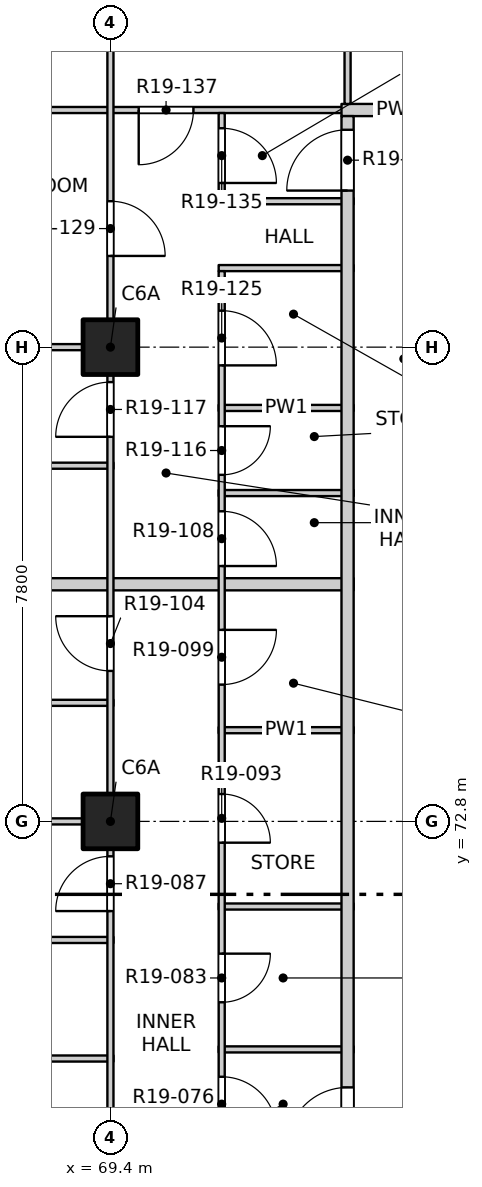
"""IFC4 building model, lengths in metres.
Left out: names, types, materials, properties, quantities, classifications, styles, units other than length and angle.
Written with IfcOpenShell. Run it as: python <this file> out.ifc"""

import sys

from ifc_helpers import new_model, si_unit, direction, frame, frame_2d, origin, origin_2d, place, context, subcontext, project, spatial, rectangle, extrude, element, fill, save


model = new_model("IFC4")
c1 = context("Model", 3, precision=1e-05, world=origin(), true_north=direction((0.0, 1.0)))
c2 = subcontext(c1, "Body", "Model", "MODEL_VIEW")
j1 = project(units=[si_unit("LENGTHUNIT", "METRE"), si_unit("PLANEANGLEUNIT", "RADIAN")], contexts=[c1])
p1 = place(None, origin())
s1 = spatial("IfcSite", under=j1, at=p1, CompositionType="ELEMENT")
p2 = place(p1, origin())
s2 = spatial("IfcBuilding", under=s1, at=p2, CompositionType="ELEMENT")
p3 = place(p2, frame((0.0, 0.0, 197.3)))
s3 = spatial("IfcBuildingStorey", under=s2, at=p3, CompositionType="ELEMENT", Elevation=197.3)
for number, where, z_axis, x_axis in (
    (1, (69.4, 72.8, -0.3), (0.0, 0.0, 1.0), (1.0, 0.0, 0.0)),
    (2, (69.4, 80.6, -0.3), (0.0, 0.0, 1.0), (1.0, 0.0, 0.0)),
):
    element("IfcColumn", number, at=place(p3, frame(where, z_axis=z_axis, x_axis=x_axis)), inside=s3, PredefinedType="COLUMN", context=c2, shape_type="SweptSolid", body=[
        extrude(rectangle(XDim=0.9, YDim=0.9, at=origin_2d()), origin(), (0.0, 0.0, 1.0), 3.45),
    ])
p4 = place(p3, frame((61.9, 68.9, 0.0), z_axis=(0.0, 0.0, 1.0), x_axis=(1.0, 0.0, 0.0)))
e3 = element("IfcWall", 3, at=p4, inside=s3, PredefinedType="PARTITIONING", context=c2, shape_type="SweptSolid", body=[
    extrude(rectangle(XDim=7.55, YDim=0.1, at=frame_2d((3.775, 0.0))), origin(), (0.0, 0.0, 1.0), 2.55),
])
p5 = place(p3, frame((71.18, 69.05, 0.0), z_axis=(0.0, 0.0, 1.0), x_axis=(1.0, 0.0, 0.0)))
e4 = element("IfcWall", 4, at=p5, inside=s3, PredefinedType="PARTITIONING", context=c2, shape_type="SweptSolid", body=[
    extrude(rectangle(XDim=2.22, YDim=0.1, at=frame_2d((1.11, 0.0))), origin(), (0.0, 0.0, 1.0), 2.55),
])
p6 = place(p3, frame((65.75, 70.85, 0.0), z_axis=(0.0, 0.0, 1.0), x_axis=(1.0, 0.0, 0.0)))
e5 = element("IfcWall", 5, at=p6, inside=s3, PredefinedType="PARTITIONING", context=c2, shape_type="SweptSolid", body=[
    extrude(rectangle(XDim=3.7, YDim=0.1, at=frame_2d((1.85, 0.0))), origin(), (0.0, 0.0, 1.0), 3.15),
])
p7 = place(p3, frame((71.18, 71.4, 0.0), z_axis=(0.0, 0.0, 1.0), x_axis=(1.0, 0.0, 0.0)))
e6 = element("IfcWall", 6, at=p7, inside=s3, PredefinedType="PARTITIONING", context=c2, shape_type="SweptSolid", body=[
    extrude(rectangle(XDim=2.22, YDim=0.1, at=frame_2d((1.11, 0.0))), origin(), (0.0, 0.0, 1.0), 3.15),
])
p8 = place(p3, frame((61.9, 72.8, 0.0), z_axis=(0.0, 0.0, 1.0), x_axis=(1.0, 0.0, 0.0)))
e7 = element("IfcWall", 7, at=p8, inside=s3, PredefinedType="PARTITIONING", context=c2, shape_type="SweptSolid", body=[
    extrude(rectangle(XDim=7.55, YDim=0.1, at=frame_2d((3.775, 0.0))), origin(), (0.0, 0.0, 1.0), 3.15),
])
p9 = place(p3, frame((71.18, 74.3, 0.0), z_axis=(0.0, 0.0, 1.0), x_axis=(1.0, 0.0, 0.0)))
e8 = element("IfcWall", 8, at=p9, inside=s3, PredefinedType="PARTITIONING", context=c2, shape_type="SweptSolid", body=[
    extrude(rectangle(XDim=2.22, YDim=0.1, at=frame_2d((1.11, 0.0))), origin(), (0.0, 0.0, 1.0), 3.15),
])
p10 = place(p3, frame((65.75, 74.75, 0.0), z_axis=(0.0, 0.0, 1.0), x_axis=(1.0, 0.0, 0.0)))
e9 = element("IfcWall", 9, at=p10, inside=s3, PredefinedType="PARTITIONING", context=c2, shape_type="SweptSolid", body=[
    extrude(rectangle(XDim=3.7, YDim=0.1, at=frame_2d((1.85, 0.0))), origin(), (0.0, 0.0, 1.0), 3.15),
])
p11 = place(p3, frame((61.9, 76.7, 0.0), z_axis=(0.0, 0.0, 1.0), x_axis=(1.0, 0.0, 0.0)))
e10 = element("IfcWall", 10, at=p11, inside=s3, PredefinedType="PARTITIONING", context=c2, shape_type="SweptSolid", body=[
    extrude(rectangle(XDim=11.5, YDim=0.2, at=frame_2d((5.75, 0.0))), origin(), (0.0, 0.0, 1.0), 2.55),
])
p12 = place(p3, frame((71.18, 78.2, 0.0), z_axis=(0.0, 0.0, 1.0), x_axis=(1.0, 0.0, 0.0)))
e11 = element("IfcWall", 11, at=p12, inside=s3, PredefinedType="PARTITIONING", context=c2, shape_type="SweptSolid", body=[
    extrude(rectangle(XDim=2.22, YDim=0.1, at=frame_2d((1.11, 0.0))), origin(), (0.0, 0.0, 1.0), 3.15),
])
p13 = place(p3, frame((65.75, 78.65, 0.0), z_axis=(0.0, 0.0, 1.0), x_axis=(1.0, 0.0, 0.0)))
e12 = element("IfcWall", 12, at=p13, inside=s3, PredefinedType="PARTITIONING", context=c2, shape_type="SweptSolid", body=[
    extrude(rectangle(XDim=3.7, YDim=0.1, at=frame_2d((1.85, 0.0))), origin(), (0.0, 0.0, 1.0), 3.15),
])
p14 = place(p3, frame((71.18, 79.6, 0.0), z_axis=(0.0, 0.0, 1.0), x_axis=(1.0, 0.0, 0.0)))
e13 = element("IfcWall", 13, at=p14, inside=s3, PredefinedType="PARTITIONING", context=c2, shape_type="SweptSolid", body=[
    extrude(rectangle(XDim=2.22, YDim=0.1, at=frame_2d((1.11, 0.0))), origin(), (0.0, 0.0, 1.0), 3.15),
])
p15 = place(p3, frame((61.9, 80.6, 0.0), z_axis=(0.0, 0.0, 1.0), x_axis=(1.0, 0.0, 0.0)))
e14 = element("IfcWall", 14, at=p15, inside=s3, PredefinedType="PARTITIONING", context=c2, shape_type="SweptSolid", body=[
    extrude(rectangle(XDim=7.55, YDim=0.1, at=frame_2d((3.775, 0.0))), origin(), (0.0, 0.0, 1.0), 3.15),
])
for number, where, z_axis, x_axis in (
    (15, (71.18, 81.9, 0.0), (0.0, 0.0, 1.0), (1.0, 0.0, 0.0)),
    (16, (71.18, 83.0, 0.0), (0.0, 0.0, 1.0), (1.0, 0.0, 0.0)),
):
    element("IfcWall", number, at=place(p3, frame(where, z_axis=z_axis, x_axis=x_axis)), inside=s3, PredefinedType="PARTITIONING", context=c2, shape_type="SweptSolid", body=[
        extrude(rectangle(XDim=2.22, YDim=0.1, at=frame_2d((1.11, 0.0))), origin(), (0.0, 0.0, 1.0), 3.15),
    ])
p16 = place(p3, frame((61.9, 84.5, 0.0), z_axis=(0.0, 0.0, 1.0), x_axis=(1.0, 0.0, 0.0)))
e17 = element("IfcWall", 17, at=p16, inside=s3, PredefinedType="PARTITIONING", context=c2, shape_type="SweptSolid", body=[
    extrude(rectangle(XDim=11.5, YDim=0.1, at=frame_2d((5.75, 0.0))), origin(), (0.0, 0.0, 1.0), 3.15),
])
p17 = place(p16, frame((7.965, 0.0, 0.0)))
e18 = element("IfcOpeningElement", 18, at=p17, cuts=e17, PredefinedType="OPENING", context=c2, shape_type="SweptSolid", body=[
    extrude(rectangle(XDim=0.9, YDim=2.1, at=frame_2d((0.45, 1.05))), frame((0.0, 0.06, 0.0), z_axis=(0.0, -1.0, 0.0), x_axis=(1.0, 0.0, 0.0)), (0.0, 0.0, 1.0), 0.12),
])
p18 = place(p3, frame((73.2, 84.5, 0.0), z_axis=(0.0, 0.0, 1.0), x_axis=(1.0, 0.0, 0.0)))
e19 = element("IfcWall", 19, at=p18, inside=s3, PredefinedType="PARTITIONING", context=c2, shape_type="SweptSolid", body=[
    extrude(rectangle(XDim=1.85, YDim=0.2, at=frame_2d((0.925, 0.0))), origin(), (0.0, 0.0, 1.0), 3.15),
])
p19 = place(p3, frame((69.4, 41.9, 0.0), z_axis=(0.0, 0.0, 1.0), x_axis=(0.0, 1.0, 0.0)))
e20 = element("IfcWall", 20, at=p19, inside=s3, PredefinedType="PARTITIONING", context=c2, shape_type="SweptSolid", body=[
    extrude(rectangle(XDim=46.2, YDim=0.1, at=frame_2d((23.1, 0.0))), origin(), (0.0, 0.0, 1.0), 3.15),
])
p20 = place(p19, frame((1.2, 0.0, 0.0)))
e21 = element("IfcOpeningElement", 21, at=p20, cuts=e20, PredefinedType="OPENING", context=c2, shape_type="SweptSolid", body=[
    extrude(rectangle(XDim=0.9, YDim=2.1, at=frame_2d((0.45, 1.05))), frame((0.0, 0.06, 0.0), z_axis=(0.0, -1.0, 0.0), x_axis=(1.0, 0.0, 0.0)), (0.0, 0.0, 1.0), 0.12),
])
p21 = place(p19, frame((5.1, 0.0, 0.0)))
e22 = element("IfcOpeningElement", 22, at=p21, cuts=e20, PredefinedType="OPENING", context=c2, shape_type="SweptSolid", body=[
    extrude(rectangle(XDim=0.9, YDim=2.1, at=frame_2d((0.45, 1.05))), frame((0.0, 0.06, 0.0), z_axis=(0.0, -1.0, 0.0), x_axis=(1.0, 0.0, 0.0)), (0.0, 0.0, 1.0), 0.12),
])
p22 = place(p19, frame((9.0, 0.0, 0.0)))
e23 = element("IfcOpeningElement", 23, at=p22, cuts=e20, PredefinedType="OPENING", context=c2, shape_type="SweptSolid", body=[
    extrude(rectangle(XDim=0.9, YDim=2.1, at=frame_2d((0.45, 1.05))), frame((0.0, 0.06, 0.0), z_axis=(0.0, -1.0, 0.0), x_axis=(1.0, 0.0, 0.0)), (0.0, 0.0, 1.0), 0.12),
])
p23 = place(p19, frame((13.85, 0.0, 0.0)))
e24 = element("IfcOpeningElement", 24, at=p23, cuts=e20, PredefinedType="OPENING", context=c2, shape_type="SweptSolid", body=[
    extrude(rectangle(XDim=0.9, YDim=2.1, at=frame_2d((0.45, 1.05))), frame((0.0, 0.06, 0.0), z_axis=(0.0, -1.0, 0.0), x_axis=(1.0, 0.0, 0.0)), (0.0, 0.0, 1.0), 0.12),
])
p24 = place(p19, frame((17.775, 0.0, 0.0)))
e25 = element("IfcOpeningElement", 25, at=p24, cuts=e20, PredefinedType="OPENING", context=c2, shape_type="SweptSolid", body=[
    extrude(rectangle(XDim=0.9, YDim=2.1, at=frame_2d((0.45, 1.05))), frame((0.0, 0.06, 0.0), z_axis=(0.0, -1.0, 0.0), x_axis=(1.0, 0.0, 0.0)), (0.0, 0.0, 1.0), 0.12),
])
p25 = place(p19, frame((21.625, 0.0, 0.0)))
e26 = element("IfcOpeningElement", 26, at=p25, cuts=e20, PredefinedType="OPENING", context=c2, shape_type="SweptSolid", body=[
    extrude(rectangle(XDim=0.9, YDim=2.1, at=frame_2d((0.45, 1.05))), frame((0.0, 0.06, 0.0), z_axis=(0.0, -1.0, 0.0), x_axis=(1.0, 0.0, 0.0)), (0.0, 0.0, 1.0), 0.12),
])
p26 = place(p19, frame((24.6, 0.0, 0.0)))
e27 = element("IfcOpeningElement", 27, at=p26, cuts=e20, PredefinedType="OPENING", context=c2, shape_type="SweptSolid", body=[
    extrude(rectangle(XDim=0.9, YDim=2.1, at=frame_2d((0.45, 1.05))), frame((0.0, 0.06, 0.0), z_axis=(0.0, -1.0, 0.0), x_axis=(1.0, 0.0, 0.0)), (0.0, 0.0, 1.0), 0.12),
])
p27 = place(p19, frame((29.425, 0.0, 0.0)))
e28 = element("IfcOpeningElement", 28, at=p27, cuts=e20, PredefinedType="OPENING", context=c2, shape_type="SweptSolid", body=[
    extrude(rectangle(XDim=0.9, YDim=2.1, at=frame_2d((0.45, 1.05))), frame((0.0, 0.06, 0.0), z_axis=(0.0, -1.0, 0.0), x_axis=(1.0, 0.0, 0.0)), (0.0, 0.0, 1.0), 0.12),
])
p28 = place(p19, frame((33.375, 0.0, 0.0)))
e29 = element("IfcOpeningElement", 29, at=p28, cuts=e20, PredefinedType="OPENING", context=c2, shape_type="SweptSolid", body=[
    extrude(rectangle(XDim=0.9, YDim=2.1, at=frame_2d((0.45, 1.05))), frame((0.0, 0.06, 0.0), z_axis=(0.0, -1.0, 0.0), x_axis=(1.0, 0.0, 0.0)), (0.0, 0.0, 1.0), 0.12),
])
p29 = place(p19, frame((37.225, 0.0, 0.0)))
e30 = element("IfcOpeningElement", 30, at=p29, cuts=e20, PredefinedType="OPENING", context=c2, shape_type="SweptSolid", body=[
    extrude(rectangle(XDim=0.9, YDim=2.1, at=frame_2d((0.45, 1.05))), frame((0.0, 0.06, 0.0), z_axis=(0.0, -1.0, 0.0), x_axis=(1.0, 0.0, 0.0)), (0.0, 0.0, 1.0), 0.12),
])
p30 = place(p19, frame((40.2, 0.0, 0.0)))
e31 = element("IfcOpeningElement", 31, at=p30, cuts=e20, PredefinedType="OPENING", context=c2, shape_type="SweptSolid", body=[
    extrude(rectangle(XDim=0.9, YDim=2.1, at=frame_2d((0.45, 1.05))), frame((0.0, 0.06, 0.0), z_axis=(0.0, -1.0, 0.0), x_axis=(1.0, 0.0, 0.0)), (0.0, 0.0, 1.0), 0.12),
])
p31 = place(p19, frame((44.1, 0.0, 0.0)))
e32 = element("IfcOpeningElement", 32, at=p31, cuts=e20, PredefinedType="OPENING", context=c2, shape_type="SweptSolid", body=[
    extrude(rectangle(XDim=0.9, YDim=2.1, at=frame_2d((0.45, 1.05))), frame((0.0, 0.06, 0.0), z_axis=(0.0, -1.0, 0.0), x_axis=(1.0, 0.0, 0.0)), (0.0, 0.0, 1.0), 0.12),
])
p32 = place(p3, frame((71.23, 67.3, 0.0), z_axis=(0.0, 0.0, 1.0), x_axis=(0.0, 1.0, 0.0)))
e33 = element("IfcWall", 33, at=p32, inside=s3, PredefinedType="PARTITIONING", context=c2, shape_type="SweptSolid", body=[
    extrude(rectangle(XDim=14.55, YDim=0.1, at=frame_2d((7.275, 0.0))), origin(), (0.0, 0.0, 1.0), 3.15),
])
p33 = place(p32, frame((0.4, 0.0, 0.0)))
e34 = element("IfcOpeningElement", 34, at=p33, cuts=e33, PredefinedType="OPENING", context=c2, shape_type="SweptSolid", body=[
    extrude(rectangle(XDim=0.9, YDim=2.1, at=frame_2d((0.45, 1.05))), frame((0.0, 0.06, 0.0), z_axis=(0.0, -1.0, 0.0), x_axis=(1.0, 0.0, 0.0)), (0.0, 0.0, 1.0), 0.12),
])
p34 = place(p32, frame((2.525, 0.0, 0.0)))
e35 = element("IfcOpeningElement", 35, at=p34, cuts=e33, PredefinedType="OPENING", context=c2, shape_type="SweptSolid", body=[
    extrude(rectangle(XDim=0.8, YDim=2.1, at=frame_2d((0.4, 1.05))), frame((0.0, 0.06, 0.0), z_axis=(0.0, -1.0, 0.0), x_axis=(1.0, 0.0, 0.0)), (0.0, 0.0, 1.0), 0.12),
])
p35 = place(p32, frame((5.15, 0.0, 0.0)))
e36 = element("IfcOpeningElement", 36, at=p35, cuts=e33, PredefinedType="OPENING", context=c2, shape_type="SweptSolid", body=[
    extrude(rectangle(XDim=0.8, YDim=2.1, at=frame_2d((0.4, 1.05))), frame((0.0, 0.06, 0.0), z_axis=(0.0, -1.0, 0.0), x_axis=(1.0, 0.0, 0.0)), (0.0, 0.0, 1.0), 0.12),
])
p36 = place(p32, frame((7.75, 0.0, 0.0)))
e37 = element("IfcOpeningElement", 37, at=p36, cuts=e33, PredefinedType="OPENING", context=c2, shape_type="SweptSolid", body=[
    extrude(rectangle(XDim=0.9, YDim=2.1, at=frame_2d((0.45, 1.05))), frame((0.0, 0.06, 0.0), z_axis=(0.0, -1.0, 0.0), x_axis=(1.0, 0.0, 0.0)), (0.0, 0.0, 1.0), 0.12),
])
p37 = place(p32, frame((9.7, 0.0, 0.0)))
e38 = element("IfcOpeningElement", 38, at=p37, cuts=e33, PredefinedType="OPENING", context=c2, shape_type="SweptSolid", body=[
    extrude(rectangle(XDim=0.9, YDim=2.1, at=frame_2d((0.45, 1.05))), frame((0.0, 0.06, 0.0), z_axis=(0.0, -1.0, 0.0), x_axis=(1.0, 0.0, 0.0)), (0.0, 0.0, 1.0), 0.12),
])
p38 = place(p32, frame((11.2, 0.0, 0.0)))
e39 = element("IfcOpeningElement", 39, at=p38, cuts=e33, PredefinedType="OPENING", context=c2, shape_type="SweptSolid", body=[
    extrude(rectangle(XDim=0.8, YDim=2.1, at=frame_2d((0.4, 1.05))), frame((0.0, 0.06, 0.0), z_axis=(0.0, -1.0, 0.0), x_axis=(1.0, 0.0, 0.0)), (0.0, 0.0, 1.0), 0.12),
])
p39 = place(p32, frame((13.0, 0.0, 0.0)))
e40 = element("IfcOpeningElement", 40, at=p39, cuts=e33, PredefinedType="OPENING", context=c2, shape_type="SweptSolid", body=[
    extrude(rectangle(XDim=0.9, YDim=2.1, at=frame_2d((0.45, 1.05))), frame((0.0, 0.06, 0.0), z_axis=(0.0, -1.0, 0.0), x_axis=(1.0, 0.0, 0.0)), (0.0, 0.0, 1.0), 0.12),
])
p40 = place(p3, frame((71.23, 83.05, 0.0), z_axis=(0.0, 0.0, 1.0), x_axis=(0.0, 1.0, 0.0)))
e41 = element("IfcWall", 41, at=p40, inside=s3, PredefinedType="PARTITIONING", context=c2, shape_type="SweptSolid", body=[
    extrude(rectangle(XDim=1.4, YDim=0.1, at=frame_2d((0.7, 0.0))), origin(), (0.0, 0.0, 1.0), 3.15),
])
p41 = place(p40, frame((0.25, 0.0, 0.0)))
e42 = element("IfcOpeningElement", 42, at=p41, cuts=e41, PredefinedType="OPENING", context=c2, shape_type="SweptSolid", body=[
    extrude(rectangle(XDim=0.9, YDim=2.1, at=frame_2d((0.45, 1.05))), frame((0.0, 0.06, 0.0), z_axis=(0.0, -1.0, 0.0), x_axis=(1.0, 0.0, 0.0)), (0.0, 0.0, 1.0), 0.12),
])
p42 = place(p3, frame((73.3, 49.5, 0.0), z_axis=(0.0, 0.0, 1.0), x_axis=(0.0, 1.0, 0.0)))
e43 = element("IfcWall", 43, at=p42, inside=s3, PredefinedType="PARTITIONING", context=c2, shape_type="SweptSolid", body=[
    extrude(rectangle(XDim=34.9, YDim=0.2, at=frame_2d((17.45, 0.0))), origin(), (0.0, 0.0, 1.0), 3.15),
])
p43 = place(p42, frame((9.725, 0.0, 0.0)))
e44 = element("IfcOpeningElement", 44, at=p43, cuts=e43, PredefinedType="OPENING", context=c2, shape_type="SweptSolid", body=[
    extrude(rectangle(XDim=1.0, YDim=2.1, at=frame_2d((0.5, 1.05))), frame((0.0, 0.11, 0.0), z_axis=(0.0, -1.0, 0.0), x_axis=(1.0, 0.0, 0.0)), (0.0, 0.0, 1.0), 0.22),
])
p44 = place(p42, frame((17.925, 0.0, 0.0)))
e45 = element("IfcOpeningElement", 45, at=p44, cuts=e43, PredefinedType="OPENING", context=c2, shape_type="SweptSolid", body=[
    extrude(rectangle(XDim=1.0, YDim=2.1, at=frame_2d((0.5, 1.05))), frame((0.0, 0.11, 0.0), z_axis=(0.0, -1.0, 0.0), x_axis=(1.0, 0.0, 0.0)), (0.0, 0.0, 1.0), 0.22),
])
p45 = place(p42, frame((33.675, 0.0, 0.0)))
e46 = element("IfcOpeningElement", 46, at=p45, cuts=e43, PredefinedType="OPENING", context=c2, shape_type="SweptSolid", body=[
    extrude(rectangle(XDim=1.0, YDim=2.1, at=frame_2d((0.5, 1.05))), frame((0.0, 0.11, 0.0), z_axis=(0.0, -1.0, 0.0), x_axis=(1.0, 0.0, 0.0)), (0.0, 0.0, 1.0), 0.22),
])
p46 = place(p3, frame((73.3, 84.6, 0.0), z_axis=(0.0, 0.0, 1.0), x_axis=(0.0, 1.0, 0.0)))
e47 = element("IfcWall", 47, at=p46, inside=s3, PredefinedType="PARTITIONING", context=c2, shape_type="SweptSolid", body=[
    extrude(rectangle(XDim=3.5, YDim=0.1, at=frame_2d((1.75, 0.0))), origin(), (0.0, 0.0, 1.0), 3.15),
])
p47 = place(p46, frame((1.4, 0.0, 0.0)))
e48 = element("IfcOpeningElement", 48, at=p47, cuts=e47, PredefinedType="OPENING", context=c2, shape_type="SweptSolid", body=[
    extrude(rectangle(XDim=0.9, YDim=2.1, at=frame_2d((0.45, 1.05))), frame((0.0, 0.06, 0.0), z_axis=(0.0, -1.0, 0.0), x_axis=(1.0, 0.0, 0.0)), (0.0, 0.0, 1.0), 0.12),
])
p48 = place(p44, origin())
e49 = element("IfcDoor", 49, at=p48, inside=s3, OperationType="SINGLE_SWING_RIGHT", PredefinedType="DOOR", context=c2, shape_type="SweptSolid", body=[
    extrude(rectangle(XDim=1.0, YDim=2.1, at=frame_2d((0.5, 1.05))), frame((0.0, 0.025, 0.0), z_axis=(0.0, -1.0, 0.0), x_axis=(1.0, 0.0, 0.0)), (0.0, 0.0, 1.0), 0.05),
])
fill(e45, e49)
p49 = place(p33, origin())
e50 = element("IfcDoor", 50, at=p49, inside=s3, OperationType="SINGLE_SWING_RIGHT", PredefinedType="DOOR", context=c2, shape_type="SweptSolid", body=[
    extrude(rectangle(XDim=0.9, YDim=2.1, at=frame_2d((0.45, 1.05))), frame((0.0, 0.025, 0.0), z_axis=(0.0, -1.0, 0.0), x_axis=(1.0, 0.0, 0.0)), (0.0, 0.0, 1.0), 0.05),
])
fill(e34, e50)
p50 = place(p34, origin())
e51 = element("IfcDoor", 51, at=p50, inside=s3, OperationType="SINGLE_SWING_LEFT", PredefinedType="DOOR", context=c2, shape_type="SweptSolid", body=[
    extrude(rectangle(XDim=0.8, YDim=2.1, at=frame_2d((0.4, 1.05))), frame((0.0, 0.025, 0.0), z_axis=(0.0, -1.0, 0.0), x_axis=(1.0, 0.0, 0.0)), (0.0, 0.0, 1.0), 0.05),
])
fill(e35, e51)
p51 = place(p27, origin())
e52 = element("IfcDoor", 52, at=p51, inside=s3, OperationType="SINGLE_SWING_LEFT", PredefinedType="DOOR", context=c2, shape_type="SweptSolid", body=[
    extrude(rectangle(XDim=0.9, YDim=2.1, at=frame_2d((0.45, 1.05))), frame((0.0, 0.025, 0.0), z_axis=(0.0, -1.0, 0.0), x_axis=(1.0, 0.0, 0.0)), (0.0, 0.0, 1.0), 0.05),
])
fill(e28, e52)
p52 = place(p35, origin())
e53 = element("IfcDoor", 53, at=p52, inside=s3, OperationType="SINGLE_SWING_RIGHT", PredefinedType="DOOR", context=c2, shape_type="SweptSolid", body=[
    extrude(rectangle(XDim=0.8, YDim=2.1, at=frame_2d((0.4, 1.05))), frame((0.0, 0.025, 0.0), z_axis=(0.0, -1.0, 0.0), x_axis=(1.0, 0.0, 0.0)), (0.0, 0.0, 1.0), 0.05),
])
fill(e36, e53)
p53 = place(p36, origin())
e54 = element("IfcDoor", 54, at=p53, inside=s3, OperationType="SINGLE_SWING_LEFT", PredefinedType="DOOR", context=c2, shape_type="SweptSolid", body=[
    extrude(rectangle(XDim=0.9, YDim=2.1, at=frame_2d((0.45, 1.05))), frame((0.0, 0.025, 0.0), z_axis=(0.0, -1.0, 0.0), x_axis=(1.0, 0.0, 0.0)), (0.0, 0.0, 1.0), 0.05),
])
fill(e37, e54)
p54 = place(p28, origin())
e55 = element("IfcDoor", 55, at=p54, inside=s3, OperationType="SINGLE_SWING_RIGHT", PredefinedType="DOOR", context=c2, shape_type="SweptSolid", body=[
    extrude(rectangle(XDim=0.9, YDim=2.1, at=frame_2d((0.45, 1.05))), frame((0.0, 0.025, 0.0), z_axis=(0.0, -1.0, 0.0), x_axis=(1.0, 0.0, 0.0)), (0.0, 0.0, 1.0), 0.05),
])
fill(e29, e55)
p55 = place(p37, origin())
e56 = element("IfcDoor", 56, at=p55, inside=s3, OperationType="SINGLE_SWING_RIGHT", PredefinedType="DOOR", context=c2, shape_type="SweptSolid", body=[
    extrude(rectangle(XDim=0.9, YDim=2.1, at=frame_2d((0.45, 1.05))), frame((0.0, 0.025, 0.0), z_axis=(0.0, -1.0, 0.0), x_axis=(1.0, 0.0, 0.0)), (0.0, 0.0, 1.0), 0.05),
])
fill(e38, e56)
p56 = place(p38, origin())
e57 = element("IfcDoor", 57, at=p56, inside=s3, OperationType="SINGLE_SWING_LEFT", PredefinedType="DOOR", context=c2, shape_type="SweptSolid", body=[
    extrude(rectangle(XDim=0.8, YDim=2.1, at=frame_2d((0.4, 1.05))), frame((0.0, 0.025, 0.0), z_axis=(0.0, -1.0, 0.0), x_axis=(1.0, 0.0, 0.0)), (0.0, 0.0, 1.0), 0.05),
])
fill(e39, e57)
p57 = place(p29, origin())
e58 = element("IfcDoor", 58, at=p57, inside=s3, OperationType="SINGLE_SWING_LEFT", PredefinedType="DOOR", context=c2, shape_type="SweptSolid", body=[
    extrude(rectangle(XDim=0.9, YDim=2.1, at=frame_2d((0.45, 1.05))), frame((0.0, 0.025, 0.0), z_axis=(0.0, -1.0, 0.0), x_axis=(1.0, 0.0, 0.0)), (0.0, 0.0, 1.0), 0.05),
])
fill(e30, e58)
p58 = place(p39, origin())
e59 = element("IfcDoor", 59, at=p58, inside=s3, OperationType="SINGLE_SWING_RIGHT", PredefinedType="DOOR", context=c2, shape_type="SweptSolid", body=[
    extrude(rectangle(XDim=0.9, YDim=2.1, at=frame_2d((0.45, 1.05))), frame((0.0, 0.025, 0.0), z_axis=(0.0, -1.0, 0.0), x_axis=(1.0, 0.0, 0.0)), (0.0, 0.0, 1.0), 0.05),
])
fill(e40, e59)
p59 = place(p30, origin())
e60 = element("IfcDoor", 60, at=p59, inside=s3, OperationType="SINGLE_SWING_RIGHT", PredefinedType="DOOR", context=c2, shape_type="SweptSolid", body=[
    extrude(rectangle(XDim=0.9, YDim=2.1, at=frame_2d((0.45, 1.05))), frame((0.0, 0.025, 0.0), z_axis=(0.0, -1.0, 0.0), x_axis=(1.0, 0.0, 0.0)), (0.0, 0.0, 1.0), 0.05),
])
fill(e31, e60)
p60 = place(p45, origin())
e61 = element("IfcDoor", 61, at=p60, inside=s3, OperationType="SINGLE_SWING_RIGHT", PredefinedType="DOOR", context=c2, shape_type="SweptSolid", body=[
    extrude(rectangle(XDim=1.0, YDim=2.1, at=frame_2d((0.5, 1.05))), frame((0.0, 0.025, 0.0), z_axis=(0.0, -1.0, 0.0), x_axis=(1.0, 0.0, 0.0)), (0.0, 0.0, 1.0), 0.05),
])
fill(e46, e61)
p61 = place(p41, origin())
e62 = element("IfcDoor", 62, at=p61, inside=s3, OperationType="SINGLE_SWING_RIGHT", PredefinedType="DOOR", context=c2, shape_type="SweptSolid", body=[
    extrude(rectangle(XDim=0.9, YDim=2.1, at=frame_2d((0.45, 1.05))), frame((0.0, 0.025, 0.0), z_axis=(0.0, -1.0, 0.0), x_axis=(1.0, 0.0, 0.0)), (0.0, 0.0, 1.0), 0.05),
])
fill(e42, e62)
p62 = place(p17, origin())
e63 = element("IfcDoor", 63, at=p62, inside=s3, OperationType="SINGLE_SWING_RIGHT", PredefinedType="DOOR", context=c2, shape_type="SweptSolid", body=[
    extrude(rectangle(XDim=0.9, YDim=2.1, at=frame_2d((0.45, 1.05))), frame((0.0, 0.025, 0.0), z_axis=(0.0, -1.0, 0.0), x_axis=(1.0, 0.0, 0.0)), (0.0, 0.0, 1.0), 0.05),
])
fill(e18, e63)
save(model, sys.argv[1])
